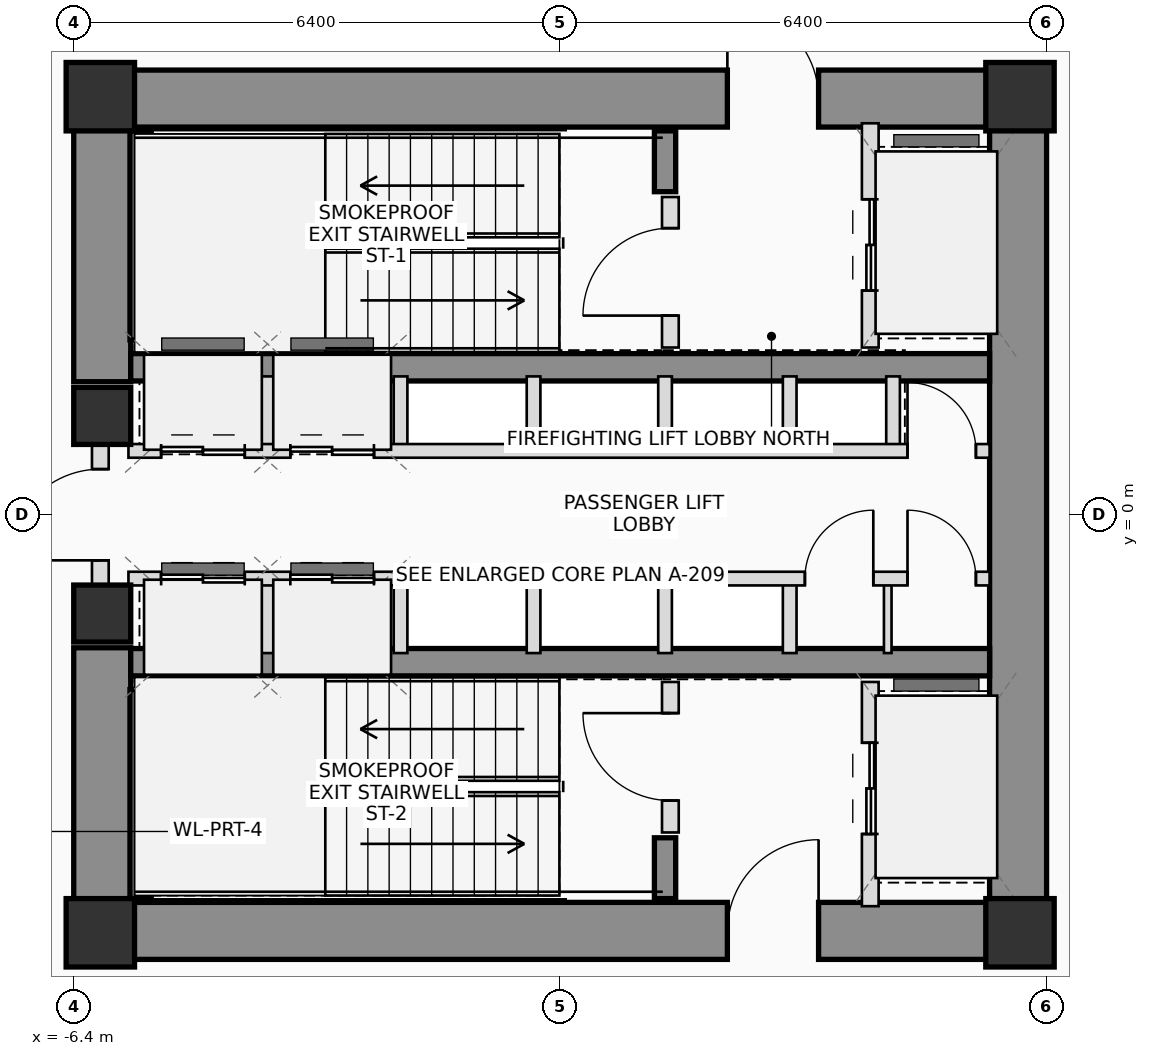
"""IFC4 building model, lengths in metres.
Left out: names, types, materials, properties, quantities, classifications, styles, units other than length and angle.
Written with IfcOpenShell. Run it as: python <this file> out.ifc"""

import sys

from ifc_helpers import new_model, si_unit, direction, frame, frame_2d, origin, origin_2d, place, context, subcontext, project, spatial, rectangle, extrude, source, transform, mapped, element, fill, save


model = new_model("IFC4")
c1 = context("Model", 3, precision=1e-05, world=origin(), true_north=direction((0.0, 1.0)))
c2 = subcontext(c1, "Body", "Model", "MODEL_VIEW")
j1 = project(units=[si_unit("LENGTHUNIT", "METRE"), si_unit("PLANEANGLEUNIT", "RADIAN")], contexts=[c1])
p1 = place(None, origin())
s1 = spatial("IfcSite", under=j1, at=p1, CompositionType="ELEMENT")
p2 = place(p1, origin())
s2 = spatial("IfcBuilding", under=s1, at=p2, CompositionType="ELEMENT")
p3 = place(p2, frame((0.0, 0.0, 93.65)))
s3 = spatial("IfcBuildingStorey", under=s2, at=p3, CompositionType="ELEMENT", Elevation=93.65)
m1 = source(origin(), c2, "Body", "SweptSolid", [
    extrude(rectangle(XDim=0.9, YDim=0.9, at=origin_2d()), origin(), (0.0, 0.0, 1.0), 3.75),
])
for number, where, z_axis, x_axis in (
    (1, (-6.05, -5.5, 0.0), (0.0, 0.0, 1.0), (1.0, 0.0, 0.0)),
    (2, (6.05, -5.5, 0.0), (0.0, 0.0, 1.0), (1.0, 0.0, 0.0)),
    (3, (6.05, 5.5, 0.0), (0.0, 0.0, 1.0), (1.0, 0.0, 0.0)),
    (4, (-6.05, 5.5, 0.0), (0.0, 0.0, 1.0), (1.0, 0.0, 0.0)),
):
    element("IfcColumn", number, at=place(p3, frame(where, z_axis=z_axis, x_axis=x_axis)), inside=s3, PredefinedType="COLUMN", context=c2, shape_type="MappedRepresentation", body=[
        mapped(m1, transform((0.0, 0.0, 0.0), scale=1.0)),
    ])
p4 = place(p3, frame((-6.4, 5.475, 0.0), z_axis=(0.0, 0.0, 1.0), x_axis=(1.0, 0.0, 0.0)))
e5 = element("IfcWall", 5, at=p4, inside=s3, PredefinedType="SHEAR", context=c2, shape_type="SweptSolid", body=[
    extrude(rectangle(XDim=12.8, YDim=0.75, at=frame_2d((6.4, 0.0))), origin(), (0.0, 0.0, 1.0), 3.75),
])
p5 = place(p4, frame((8.6, 0.0, 0.0)))
e6 = element("IfcOpeningElement", 6, at=p5, cuts=e5, PredefinedType="OPENING", context=c2, shape_type="SweptSolid", body=[
    extrude(rectangle(XDim=1.2, YDim=2.2, at=frame_2d((0.6, 1.1))), frame((0.0, 0.385, 0.0), z_axis=(0.0, -1.0, 0.0), x_axis=(1.0, 0.0, 0.0)), (0.0, 0.0, 1.0), 0.77),
])
p6 = place(p3, frame((-6.4, -5.475, 0.0), z_axis=(0.0, 0.0, 1.0), x_axis=(1.0, 0.0, 0.0)))
e7 = element("IfcWall", 7, at=p6, inside=s3, PredefinedType="SHEAR", context=c2, shape_type="SweptSolid", body=[
    extrude(rectangle(XDim=12.8, YDim=0.75, at=frame_2d((6.4, 0.0))), origin(), (0.0, 0.0, 1.0), 3.75),
])
p7 = place(p6, frame((8.6, 0.0, 0.0)))
e8 = element("IfcOpeningElement", 8, at=p7, cuts=e7, PredefinedType="OPENING", context=c2, shape_type="SweptSolid", body=[
    extrude(rectangle(XDim=1.2, YDim=2.2, at=frame_2d((0.6, 1.1))), frame((0.0, 0.385, 0.0), z_axis=(0.0, -1.0, 0.0), x_axis=(1.0, 0.0, 0.0)), (0.0, 0.0, 1.0), 0.77),
])
p8 = place(p3, frame((6.025, -5.1, 0.0), z_axis=(0.0, 0.0, 1.0), x_axis=(0.0, 1.0, 0.0)))
e9 = element("IfcWall", 9, at=p8, inside=s3, PredefinedType="SHEAR", context=c2, shape_type="SweptSolid", body=[
    extrude(rectangle(XDim=10.2, YDim=0.75, at=frame_2d((5.1, 0.0))), origin(), (0.0, 0.0, 1.0), 3.75),
])
for number, where, z_axis, x_axis in (
    (10, (-6.025, -5.1, 0.0), (0.0, 0.0, 1.0), (0.0, 1.0, 0.0)),
    (11, (-6.025, 1.75, 0.0), (0.0, 0.0, 1.0), (0.0, 1.0, 0.0)),
):
    element("IfcWall", number, at=place(p3, frame(where, z_axis=z_axis, x_axis=x_axis)), inside=s3, PredefinedType="SHEAR", context=c2, shape_type="SweptSolid", body=[
        extrude(rectangle(XDim=3.35, YDim=0.75, at=frame_2d((1.675, 0.0))), origin(), (0.0, 0.0, 1.0), 3.75),
    ])
for number, where, z_axis, x_axis in (
    (12, (-5.65, 1.94, 0.0), (0.0, 0.0, 1.0), (1.0, 0.0, 0.0)),
    (13, (-5.65, -1.94, 0.0), (0.0, 0.0, 1.0), (1.0, 0.0, 0.0)),
):
    element("IfcWall", number, at=place(p3, frame(where, z_axis=z_axis, x_axis=x_axis)), inside=s3, PredefinedType="SHEAR", context=c2, shape_type="SweptSolid", body=[
        extrude(rectangle(XDim=11.3, YDim=0.36, at=frame_2d((5.65, 0.0))), origin(), (0.0, 0.0, 1.0), 3.75),
    ])
p9 = place(p3, frame((-5.52, 2.3, 0.0), z_axis=(0.0, 0.0, 1.0), x_axis=(0.0, 1.0, 0.0)))
e14 = element("IfcWall", 14, at=p9, inside=s3, PredefinedType="SHEAR", context=c2, shape_type="SweptSolid", body=[
    extrude(rectangle(XDim=2.75, YDim=0.28, at=frame_2d((1.375, 0.0))), origin(), (0.0, 0.0, 1.0), 3.75),
])
p10 = place(p3, frame((1.38, 4.25, 0.0), z_axis=(0.0, 0.0, 1.0), x_axis=(0.0, 1.0, 0.0)))
e15 = element("IfcWall", 15, at=p10, inside=s3, PredefinedType="SHEAR", context=c2, shape_type="SweptSolid", body=[
    extrude(rectangle(XDim=0.8, YDim=0.28, at=frame_2d((0.4, 0.0))), origin(), (0.0, 0.0, 1.0), 3.75),
])
p11 = place(p3, frame((-5.52, -5.05, 0.0), z_axis=(0.0, 0.0, 1.0), x_axis=(0.0, 1.0, 0.0)))
e16 = element("IfcWall", 16, at=p11, inside=s3, PredefinedType="SHEAR", context=c2, shape_type="SweptSolid", body=[
    extrude(rectangle(XDim=2.75, YDim=0.28, at=frame_2d((1.375, 0.0))), origin(), (0.0, 0.0, 1.0), 3.75),
])
p12 = place(p3, frame((1.38, -5.05, 0.0), z_axis=(0.0, 0.0, 1.0), x_axis=(0.0, 1.0, 0.0)))
e17 = element("IfcWall", 17, at=p12, inside=s3, PredefinedType="SHEAR", context=c2, shape_type="SweptSolid", body=[
    extrude(rectangle(XDim=0.8, YDim=0.28, at=frame_2d((0.4, 0.0))), origin(), (0.0, 0.0, 1.0), 3.75),
])
m2 = source(origin(), c2, "Body", "SweptSolid", [
    extrude(rectangle(XDim=0.75, YDim=0.75, at=origin_2d()), origin(), (0.0, 0.0, 1.0), 3.75),
])
for number, where, z_axis, x_axis in (
    (18, (-6.025, -1.3, 0.0), (0.0, 0.0, 1.0), (1.0, 0.0, 0.0)),
    (19, (-6.025, 1.3, 0.0), (0.0, 0.0, 1.0), (1.0, 0.0, 0.0)),
):
    element("IfcColumn", number, at=place(p3, frame(where, z_axis=z_axis, x_axis=x_axis)), inside=s3, PredefinedType="COLUMN", context=c2, shape_type="MappedRepresentation", body=[
        mapped(m2, transform((0.0, 0.0, 0.0), scale=1.0)),
    ])
p13 = place(p3, frame((-6.05, -0.95, 0.0), z_axis=(0.0, 0.0, 1.0), x_axis=(0.0, 1.0, 0.0)))
e20 = element("IfcWall", 20, at=p13, inside=s3, PredefinedType="PLUMBINGWALL", context=c2, shape_type="SweptSolid", body=[
    extrude(rectangle(XDim=1.9, YDim=0.22, at=frame_2d((0.95, 0.0))), origin(), (0.0, 0.0, 1.0), 2.525),
])
p14 = place(p13, frame((0.35, 0.0, 0.0)))
e21 = element("IfcOpeningElement", 21, at=p14, cuts=e20, PredefinedType="OPENING", context=c2, shape_type="SweptSolid", body=[
    extrude(rectangle(XDim=1.2, YDim=2.2, at=frame_2d((0.6, 1.1))), frame((0.0, 0.12, 0.0), z_axis=(0.0, -1.0, 0.0), x_axis=(1.0, 0.0, 0.0)), (0.0, 0.0, 1.0), 0.24),
])
p15 = place(p3, frame((1.45, 2.2, 0.0), z_axis=(0.0, 0.0, 1.0), x_axis=(0.0, 1.0, 0.0)))
e22 = element("IfcWall", 22, at=p15, inside=s3, PredefinedType="PLUMBINGWALL", context=c2, shape_type="SweptSolid", body=[
    extrude(rectangle(XDim=1.98, YDim=0.22, at=frame_2d((0.99, 0.0))), origin(), (0.0, 0.0, 1.0), 3.545),
])
p16 = place(p15, frame((0.42, 0.0, 0.0)))
e23 = element("IfcOpeningElement", 23, at=p16, cuts=e22, PredefinedType="OPENING", context=c2, shape_type="SweptSolid", body=[
    extrude(rectangle(XDim=1.15, YDim=2.15, at=frame_2d((0.575, 1.075))), frame((0.0, 0.12, 0.0), z_axis=(0.0, -1.0, 0.0), x_axis=(1.0, 0.0, 0.0)), (0.0, 0.0, 1.0), 0.24),
])
p17 = place(p3, frame((4.08, 2.2, 0.0), z_axis=(0.0, 0.0, 1.0), x_axis=(0.0, 1.0, 0.0)))
e24 = element("IfcWall", 24, at=p17, inside=s3, PredefinedType="PLUMBINGWALL", context=c2, shape_type="SweptSolid", body=[
    extrude(rectangle(XDim=2.95, YDim=0.22, at=frame_2d((1.475, 0.0))), origin(), (0.0, 0.0, 1.0), 3.545),
])
p18 = place(p17, frame((0.75, 0.0, 0.0)))
e25 = element("IfcOpeningElement", 25, at=p18, cuts=e24, PredefinedType="OPENING", context=c2, shape_type="SweptSolid", body=[
    extrude(rectangle(XDim=1.2, YDim=2.25, at=frame_2d((0.6, 1.125))), frame((0.0, 0.12, 0.0), z_axis=(0.0, -1.0, 0.0), x_axis=(1.0, 0.0, 0.0)), (0.0, 0.0, 1.0), 0.24),
])
p19 = place(p3, frame((1.45, -4.18, 0.0), z_axis=(0.0, 0.0, 1.0), x_axis=(0.0, 1.0, 0.0)))
e26 = element("IfcWall", 26, at=p19, inside=s3, PredefinedType="PLUMBINGWALL", context=c2, shape_type="SweptSolid", body=[
    extrude(rectangle(XDim=1.98, YDim=0.22, at=frame_2d((0.99, 0.0))), origin(), (0.0, 0.0, 1.0), 3.545),
])
p20 = place(p19, frame((0.42, 0.0, 0.0)))
e27 = element("IfcOpeningElement", 27, at=p20, cuts=e26, PredefinedType="OPENING", context=c2, shape_type="SweptSolid", body=[
    extrude(rectangle(XDim=1.15, YDim=2.15, at=frame_2d((0.575, 1.075))), frame((0.0, 0.12, 0.0), z_axis=(0.0, -1.0, 0.0), x_axis=(1.0, 0.0, 0.0)), (0.0, 0.0, 1.0), 0.24),
])
p21 = place(p3, frame((4.08, -5.15, 0.0), z_axis=(0.0, 0.0, 1.0), x_axis=(0.0, 1.0, 0.0)))
e28 = element("IfcWall", 28, at=p21, inside=s3, PredefinedType="PLUMBINGWALL", context=c2, shape_type="SweptSolid", body=[
    extrude(rectangle(XDim=2.95, YDim=0.22, at=frame_2d((1.475, 0.0))), origin(), (0.0, 0.0, 1.0), 3.545),
])
p22 = place(p21, frame((0.95, 0.0, 0.0)))
e29 = element("IfcOpeningElement", 29, at=p22, cuts=e28, PredefinedType="OPENING", context=c2, shape_type="SweptSolid", body=[
    extrude(rectangle(XDim=1.2, YDim=2.25, at=frame_2d((0.6, 1.125))), frame((0.0, 0.12, 0.0), z_axis=(0.0, -1.0, 0.0), x_axis=(1.0, 0.0, 0.0)), (0.0, 0.0, 1.0), 0.24),
])
for number, where, z_axis, x_axis in (
    (30, (-3.85, 0.84, 0.0), (0.0, 0.0, 1.0), (0.0, 1.0, 0.0)),
    (31, (-3.85, -1.82, 0.0), (0.0, 0.0, 1.0), (0.0, 1.0, 0.0)),
    (32, (-2.1, 0.84, 0.0), (0.0, 0.0, 1.0), (0.0, 1.0, 0.0)),
    (33, (-2.1, -1.82, 0.0), (0.0, 0.0, 1.0), (0.0, 1.0, 0.0)),
    (34, (-0.35, 0.84, 0.0), (0.0, 0.0, 1.0), (0.0, 1.0, 0.0)),
    (35, (-0.35, -1.82, 0.0), (0.0, 0.0, 1.0), (0.0, 1.0, 0.0)),
    (36, (1.38, 0.84, 0.0), (0.0, 0.0, 1.0), (0.0, 1.0, 0.0)),
    (37, (1.38, -1.82, 0.0), (0.0, 0.0, 1.0), (0.0, 1.0, 0.0)),
    (38, (3.02, 0.84, 0.0), (0.0, 0.0, 1.0), (0.0, 1.0, 0.0)),
    (39, (4.38, 0.84, 0.0), (0.0, 0.0, 1.0), (0.0, 1.0, 0.0)),
    (40, (3.02, -1.82, 0.0), (0.0, 0.0, 1.0), (0.0, 1.0, 0.0)),
):
    element("IfcWall", number, at=place(p3, frame(where, z_axis=z_axis, x_axis=x_axis)), inside=s3, PredefinedType="PLUMBINGWALL", context=c2, shape_type="SweptSolid", body=[
        extrude(rectangle(XDim=0.98, YDim=0.18, at=frame_2d((0.49, 0.0))), origin(), (0.0, 0.0, 1.0), 3.545),
    ])
p23 = place(p3, frame((4.31, -1.82, 0.0), z_axis=(0.0, 0.0, 1.0), x_axis=(0.0, 1.0, 0.0)))
e41 = element("IfcWall", 41, at=p23, inside=s3, PredefinedType="PARTITIONING", context=c2, shape_type="SweptSolid", body=[
    extrude(rectangle(XDim=0.98, YDim=0.1, at=frame_2d((0.49, 0.0))), origin(), (0.0, 0.0, 1.0), 3.545),
])
p24 = place(p3, frame((-5.68, 0.84, 0.0), z_axis=(0.0, 0.0, 1.0), x_axis=(1.0, 0.0, 0.0)))
e42 = element("IfcWall", 42, at=p24, inside=s3, PredefinedType="PLUMBINGWALL", context=c2, shape_type="SweptSolid", body=[
    extrude(rectangle(XDim=11.33, YDim=0.18, at=frame_2d((5.665, 0.0))), origin(), (0.0, 0.0, 1.0), 3.545),
])
p25 = place(p24, frame((0.43, 0.0, 0.0)))
e43 = element("IfcOpeningElement", 43, at=p25, cuts=e42, PredefinedType="OPENING", context=c2, shape_type="SweptSolid", body=[
    extrude(rectangle(XDim=1.1, YDim=2.2, at=frame_2d((0.55, 1.1))), frame((0.0, 0.1, 0.0), z_axis=(0.0, -1.0, 0.0), x_axis=(1.0, 0.0, 0.0)), (0.0, 0.0, 1.0), 0.2),
])
p26 = place(p24, frame((2.13, 0.0, 0.0)))
e44 = element("IfcOpeningElement", 44, at=p26, cuts=e42, PredefinedType="OPENING", context=c2, shape_type="SweptSolid", body=[
    extrude(rectangle(XDim=1.1, YDim=2.2, at=frame_2d((0.55, 1.1))), frame((0.0, 0.1, 0.0), z_axis=(0.0, -1.0, 0.0), x_axis=(1.0, 0.0, 0.0)), (0.0, 0.0, 1.0), 0.2),
])
p27 = place(p24, frame((10.25, 0.0, 0.0)))
e45 = element("IfcOpeningElement", 45, at=p27, cuts=e42, PredefinedType="OPENING", context=c2, shape_type="SweptSolid", body=[
    extrude(rectangle(XDim=0.9, YDim=2.05, at=frame_2d((0.45, 1.025))), frame((0.0, 0.1, 0.0), z_axis=(0.0, -1.0, 0.0), x_axis=(1.0, 0.0, 0.0)), (0.0, 0.0, 1.0), 0.2),
])
p28 = place(p3, frame((-5.68, -0.84, 0.0), z_axis=(0.0, 0.0, 1.0), x_axis=(1.0, 0.0, 0.0)))
e46 = element("IfcWall", 46, at=p28, inside=s3, PredefinedType="PLUMBINGWALL", context=c2, shape_type="SweptSolid", body=[
    extrude(rectangle(XDim=11.33, YDim=0.18, at=frame_2d((5.665, 0.0))), origin(), (0.0, 0.0, 1.0), 3.545),
])
p29 = place(p28, frame((0.43, 0.0, 0.0)))
e47 = element("IfcOpeningElement", 47, at=p29, cuts=e46, PredefinedType="OPENING", context=c2, shape_type="SweptSolid", body=[
    extrude(rectangle(XDim=1.1, YDim=2.2, at=frame_2d((0.55, 1.1))), frame((0.0, 0.1, 0.0), z_axis=(0.0, -1.0, 0.0), x_axis=(1.0, 0.0, 0.0)), (0.0, 0.0, 1.0), 0.2),
])
p30 = place(p28, frame((2.13, 0.0, 0.0)))
e48 = element("IfcOpeningElement", 48, at=p30, cuts=e46, PredefinedType="OPENING", context=c2, shape_type="SweptSolid", body=[
    extrude(rectangle(XDim=1.1, YDim=2.2, at=frame_2d((0.55, 1.1))), frame((0.0, 0.1, 0.0), z_axis=(0.0, -1.0, 0.0), x_axis=(1.0, 0.0, 0.0)), (0.0, 0.0, 1.0), 0.2),
])
p31 = place(p28, frame((8.9, 0.0, 0.0)))
e49 = element("IfcOpeningElement", 49, at=p31, cuts=e46, PredefinedType="OPENING", context=c2, shape_type="SweptSolid", body=[
    extrude(rectangle(XDim=0.9, YDim=2.05, at=frame_2d((0.45, 1.025))), frame((0.0, 0.1, 0.0), z_axis=(0.0, -1.0, 0.0), x_axis=(1.0, 0.0, 0.0)), (0.0, 0.0, 1.0), 0.2),
])
p32 = place(p28, frame((10.25, 0.0, 0.0)))
e50 = element("IfcOpeningElement", 50, at=p32, cuts=e46, PredefinedType="OPENING", context=c2, shape_type="SweptSolid", body=[
    extrude(rectangle(XDim=0.9, YDim=2.05, at=frame_2d((0.45, 1.025))), frame((0.0, 0.1, 0.0), z_axis=(0.0, -1.0, 0.0), x_axis=(1.0, 0.0, 0.0)), (0.0, 0.0, 1.0), 0.2),
])
p33 = place(p5, origin())
e51 = element("IfcDoor", 51, at=p33, inside=s3, OperationType="SINGLE_SWING_LEFT", PredefinedType="DOOR", context=c2, shape_type="SweptSolid", body=[
    extrude(rectangle(XDim=1.2, YDim=2.2, at=frame_2d((0.6, 1.1))), frame((0.0, 0.025, 0.0), z_axis=(0.0, -1.0, 0.0), x_axis=(1.0, 0.0, 0.0)), (0.0, 0.0, 1.0), 0.05),
])
fill(e6, e51)
p34 = place(p7, origin())
e52 = element("IfcDoor", 52, at=p34, inside=s3, OperationType="SINGLE_SWING_RIGHT", PredefinedType="DOOR", context=c2, shape_type="SweptSolid", body=[
    extrude(rectangle(XDim=1.2, YDim=2.2, at=frame_2d((0.6, 1.1))), frame((0.0, 0.025, 0.0), z_axis=(0.0, -1.0, 0.0), x_axis=(1.0, 0.0, 0.0)), (0.0, 0.0, 1.0), 0.05),
])
fill(e8, e52)
p35 = place(p14, origin())
e53 = element("IfcDoor", 53, at=p35, inside=s3, OperationType="SINGLE_SWING_LEFT", PredefinedType="DOOR", context=c2, shape_type="SweptSolid", body=[
    extrude(rectangle(XDim=1.2, YDim=2.2, at=frame_2d((0.6, 1.1))), frame((0.0, 0.025, 0.0), z_axis=(0.0, -1.0, 0.0), x_axis=(1.0, 0.0, 0.0)), (0.0, 0.0, 1.0), 0.05),
])
fill(e21, e53)
p36 = place(p16, origin())
e54 = element("IfcDoor", 54, at=p36, inside=s3, OperationType="SINGLE_SWING_LEFT", PredefinedType="DOOR", context=c2, shape_type="SweptSolid", body=[
    extrude(rectangle(XDim=1.15, YDim=2.15, at=frame_2d((0.575, 1.075))), frame((0.0, 0.025, 0.0), z_axis=(0.0, -1.0, 0.0), x_axis=(1.0, 0.0, 0.0)), (0.0, 0.0, 1.0), 0.05),
])
fill(e23, e54)
p37 = place(p18, origin())
e55 = element("IfcDoor", 55, at=p37, inside=s3, OperationType="DOUBLE_DOOR_SLIDING", PredefinedType="DOOR", context=c2, shape_type="SweptSolid", body=[
    extrude(rectangle(XDim=1.2, YDim=2.25, at=frame_2d((0.6, 1.125))), frame((0.0, 0.025, 0.0), z_axis=(0.0, -1.0, 0.0), x_axis=(1.0, 0.0, 0.0)), (0.0, 0.0, 1.0), 0.05),
])
fill(e25, e55)
p38 = place(p20, origin())
e56 = element("IfcDoor", 56, at=p38, inside=s3, OperationType="SINGLE_SWING_RIGHT", PredefinedType="DOOR", context=c2, shape_type="SweptSolid", body=[
    extrude(rectangle(XDim=1.15, YDim=2.15, at=frame_2d((0.575, 1.075))), frame((0.0, 0.025, 0.0), z_axis=(0.0, -1.0, 0.0), x_axis=(1.0, 0.0, 0.0)), (0.0, 0.0, 1.0), 0.05),
])
fill(e27, e56)
p39 = place(p22, origin())
e57 = element("IfcDoor", 57, at=p39, inside=s3, OperationType="DOUBLE_DOOR_SLIDING", PredefinedType="DOOR", context=c2, shape_type="SweptSolid", body=[
    extrude(rectangle(XDim=1.2, YDim=2.25, at=frame_2d((0.6, 1.125))), frame((0.0, 0.025, 0.0), z_axis=(0.0, -1.0, 0.0), x_axis=(1.0, 0.0, 0.0)), (0.0, 0.0, 1.0), 0.05),
])
fill(e29, e57)
p40 = place(p25, origin())
e58 = element("IfcDoor", 58, at=p40, inside=s3, OperationType="DOUBLE_DOOR_SLIDING", PredefinedType="DOOR", context=c2, shape_type="SweptSolid", body=[
    extrude(rectangle(XDim=1.1, YDim=2.2, at=frame_2d((0.55, 1.1))), frame((0.0, 0.025, 0.0), z_axis=(0.0, -1.0, 0.0), x_axis=(1.0, 0.0, 0.0)), (0.0, 0.0, 1.0), 0.05),
])
fill(e43, e58)
p41 = place(p26, origin())
e59 = element("IfcDoor", 59, at=p41, inside=s3, OperationType="DOUBLE_DOOR_SLIDING", PredefinedType="DOOR", context=c2, shape_type="SweptSolid", body=[
    extrude(rectangle(XDim=1.1, YDim=2.2, at=frame_2d((0.55, 1.1))), frame((0.0, 0.025, 0.0), z_axis=(0.0, -1.0, 0.0), x_axis=(1.0, 0.0, 0.0)), (0.0, 0.0, 1.0), 0.05),
])
fill(e44, e59)
p42 = place(p27, origin())
e60 = element("IfcDoor", 60, at=p42, inside=s3, OperationType="SINGLE_SWING_LEFT", PredefinedType="DOOR", context=c2, shape_type="SweptSolid", body=[
    extrude(rectangle(XDim=0.9, YDim=2.05, at=frame_2d((0.45, 1.025))), frame((0.0, 0.025, 0.0), z_axis=(0.0, -1.0, 0.0), x_axis=(1.0, 0.0, 0.0)), (0.0, 0.0, 1.0), 0.05),
])
fill(e45, e60)
p43 = place(p29, origin())
e61 = element("IfcDoor", 61, at=p43, inside=s3, OperationType="DOUBLE_DOOR_SLIDING", PredefinedType="DOOR", context=c2, shape_type="SweptSolid", body=[
    extrude(rectangle(XDim=1.1, YDim=2.2, at=frame_2d((0.55, 1.1))), frame((0.0, 0.025, 0.0), z_axis=(0.0, -1.0, 0.0), x_axis=(1.0, 0.0, 0.0)), (0.0, 0.0, 1.0), 0.05),
])
fill(e47, e61)
p44 = place(p30, origin())
e62 = element("IfcDoor", 62, at=p44, inside=s3, OperationType="DOUBLE_DOOR_SLIDING", PredefinedType="DOOR", context=c2, shape_type="SweptSolid", body=[
    extrude(rectangle(XDim=1.1, YDim=2.2, at=frame_2d((0.55, 1.1))), frame((0.0, 0.025, 0.0), z_axis=(0.0, -1.0, 0.0), x_axis=(1.0, 0.0, 0.0)), (0.0, 0.0, 1.0), 0.05),
])
fill(e48, e62)
p45 = place(p31, origin())
e63 = element("IfcDoor", 63, at=p45, inside=s3, OperationType="SINGLE_SWING_RIGHT", PredefinedType="DOOR", context=c2, shape_type="SweptSolid", body=[
    extrude(rectangle(XDim=0.9, YDim=2.05, at=frame_2d((0.45, 1.025))), frame((0.0, 0.025, 0.0), z_axis=(0.0, -1.0, 0.0), x_axis=(1.0, 0.0, 0.0)), (0.0, 0.0, 1.0), 0.05),
])
fill(e49, e63)
p46 = place(p32, origin())
e64 = element("IfcDoor", 64, at=p46, inside=s3, OperationType="SINGLE_SWING_LEFT", PredefinedType="DOOR", context=c2, shape_type="SweptSolid", body=[
    extrude(rectangle(XDim=0.9, YDim=2.05, at=frame_2d((0.45, 1.025))), frame((0.0, 0.025, 0.0), z_axis=(0.0, -1.0, 0.0), x_axis=(1.0, 0.0, 0.0)), (0.0, 0.0, 1.0), 0.05),
])
fill(e50, e64)
save(model, sys.argv[1])
